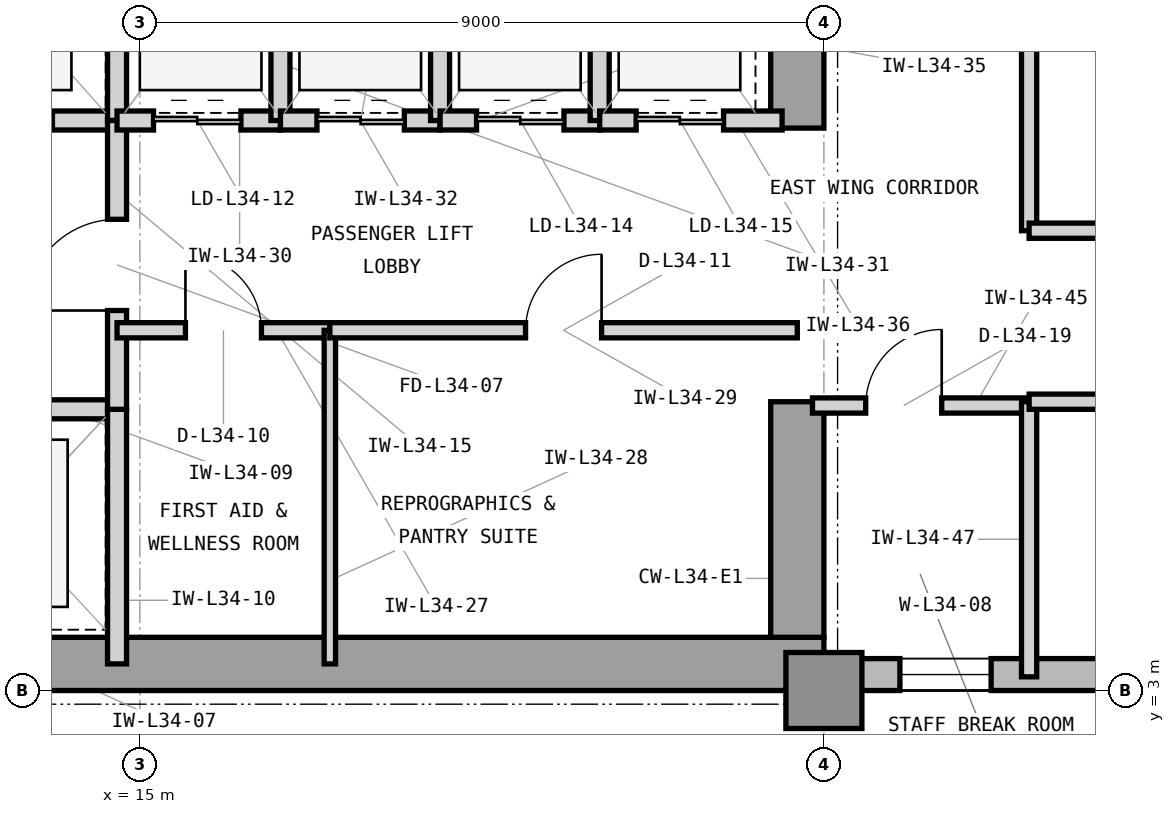
"""IFC4 building model, lengths in metres.
Left out: names, types, materials, properties, quantities, classifications, styles, units other than length and angle.
Written with IfcOpenShell. Run it as: python <this file> out.ifc"""

import sys

from ifc_helpers import new_model, si_unit, direction, frame, frame_2d, origin, origin_2d, place, context, subcontext, project, spatial, rectangle, extrude, element, fill, save


model = new_model("IFC4")
c1 = context("Model", 3, precision=1e-05, world=origin(), true_north=direction((0.0, 1.0)))
c2 = subcontext(c1, "Body", "Model", "MODEL_VIEW")
j1 = project(units=[si_unit("LENGTHUNIT", "METRE"), si_unit("PLANEANGLEUNIT", "RADIAN")], contexts=[c1])
p1 = place(None, origin())
s1 = spatial("IfcSite", under=j1, at=p1, CompositionType="ELEMENT")
p2 = place(p1, origin())
s2 = spatial("IfcBuilding", under=s1, at=p2, CompositionType="ELEMENT")
p3 = place(p2, frame((0.0, 0.0, 144.0)))
s3 = spatial("IfcBuildingStorey", under=s2, at=p3, CompositionType="ELEMENT", Elevation=144.0)
p4 = place(p3, frame((7.475, 3.35, 0.0), z_axis=(0.0, 0.0, 1.0), x_axis=(1.0, 0.0, 0.0)))
e1 = element("IfcWall", 1, at=p4, inside=s3, PredefinedType="SHEAR", context=c2, shape_type="SweptSolid", body=[
    extrude(rectangle(XDim=16.525, YDim=0.7, at=frame_2d((8.262, 0.0))), origin(), (0.0, 0.0, 1.0), 3.9),
])
p5 = place(p3, frame((23.65, 3.7, 0.0), z_axis=(0.0, 0.0, 1.0), x_axis=(0.0, 1.0, 0.0)))
e2 = element("IfcWall", 2, at=p5, inside=s3, PredefinedType="SHEAR", context=c2, shape_type="SweptSolid", body=[
    extrude(rectangle(XDim=3.1, YDim=0.7, at=frame_2d((1.55, 0.0))), origin(), (0.0, 0.0, 1.0), 3.9),
])
p6 = place(p3, frame((23.65, 10.4, 0.0), z_axis=(0.0, 0.0, 1.0), x_axis=(0.0, 1.0, 0.0)))
e3 = element("IfcWall", 3, at=p6, inside=s3, PredefinedType="SHEAR", context=c2, shape_type="SweptSolid", body=[
    extrude(rectangle(XDim=3.2, YDim=0.7, at=frame_2d((1.6, 0.0))), origin(), (0.0, 0.0, 1.0), 3.9),
])
p7 = place(p3, frame((24.0, 3.0, 0.0), z_axis=(0.0, 0.0, 1.0), x_axis=(1.0, 0.0, 0.0)))
e4 = element("IfcColumn", 4, at=p7, inside=s3, PredefinedType="COLUMN", context=c2, shape_type="SweptSolid", body=[
    extrude(rectangle(XDim=1.0, YDim=1.0, at=origin_2d()), origin(), (0.0, 0.0, 1.0), 3.9),
])
p8 = place(p3, frame((23.9, 3.21, 0.0), z_axis=(0.0, 0.0, 1.0), x_axis=(1.0, 0.0, 0.0)))
e5 = element("IfcWall", 5, at=p8, inside=s3, PredefinedType="STANDARD", context=c2, shape_type="SweptSolid", body=[
    extrude(rectangle(XDim=34.5, YDim=0.42, at=frame_2d((17.25, 0.0))), origin(), (0.0, 0.0, 1.0), 3.7),
])
p9 = place(p8, frame((11.071, 0.0, 0.85)))
e6 = element("IfcOpeningElement", 6, at=p9, cuts=e5, PredefinedType="OPENING", context=c2, shape_type="SweptSolid", body=[
    extrude(rectangle(XDim=2.5, YDim=2.25, at=frame_2d((1.25, 1.125))), frame((0.0, 0.22, 0.0), z_axis=(0.0, -1.0, 0.0), x_axis=(1.0, 0.0, 0.0)), (0.0, 0.0, 1.0), 0.44),
])
p10 = place(p8, frame((1.1, 0.0, 0.85)))
e7 = element("IfcOpeningElement", 7, at=p10, cuts=e5, PredefinedType="OPENING", context=c2, shape_type="SweptSolid", body=[
    extrude(rectangle(XDim=1.2, YDim=2.25, at=frame_2d((0.6, 1.125))), frame((0.0, 0.22, 0.0), z_axis=(0.0, -1.0, 0.0), x_axis=(1.0, 0.0, 0.0)), (0.0, 0.0, 1.0), 0.44),
])
p11 = place(p3, frame((11.82, 6.7, 0.0), z_axis=(0.0, 0.0, 1.0), x_axis=(1.0, 0.0, 0.0)))
e8 = element("IfcWall", 8, at=p11, inside=s3, PredefinedType="PARTITIONING", context=c2, shape_type="SweptSolid", body=[
    extrude(rectangle(XDim=2.88, YDim=0.25, at=frame_2d((1.44, 0.0))), origin(), (0.0, 0.0, 1.0), 3.233),
])
p12 = place(p11, frame((0.85, 0.0, 0.0)))
e9 = element("IfcOpeningElement", 9, at=p12, cuts=e8, PredefinedType="OPENING", context=c2, shape_type="SweptSolid", body=[
    extrude(rectangle(XDim=1.1, YDim=2.25, at=frame_2d((0.55, 1.125))), frame((0.0, 0.135, 0.0), z_axis=(0.0, -1.0, 0.0), x_axis=(1.0, 0.0, 0.0)), (0.0, 0.0, 1.0), 0.27),
])
p13 = place(p3, frame((14.7, 3.35, 0.0), z_axis=(0.0, 0.0, 1.0), x_axis=(0.0, 1.0, 0.0)))
e10 = element("IfcWall", 10, at=p13, inside=s3, PredefinedType="PARTITIONING", context=c2, shape_type="SweptSolid", body=[
    extrude(rectangle(XDim=3.35, YDim=0.25, at=frame_2d((1.675, 0.0))), origin(), (0.0, 0.0, 1.0), 3.69),
])
p14 = place(p3, frame((11.95, 10.5, 0.0), z_axis=(0.0, 0.0, 1.0), x_axis=(1.0, 0.0, 0.0)))
e11 = element("IfcWall", 11, at=p14, inside=s3, PredefinedType="PARTITIONING", context=c2, shape_type="SweptSolid", body=[
    extrude(rectangle(XDim=2.75, YDim=0.25, at=frame_2d((1.375, 0.0))), origin(), (0.0, 0.0, 1.0), 3.233),
])
p15 = place(p14, frame((0.8, 0.0, 0.0)))
e12 = element("IfcOpeningElement", 12, at=p15, cuts=e11, PredefinedType="OPENING", context=c2, shape_type="SweptSolid", body=[
    extrude(rectangle(XDim=1.1, YDim=2.25, at=frame_2d((0.55, 1.125))), frame((0.0, 0.135, 0.0), z_axis=(0.0, -1.0, 0.0), x_axis=(1.0, 0.0, 0.0)), (0.0, 0.0, 1.0), 0.27),
])
p16 = place(p3, frame((14.7, 10.5, 0.0), z_axis=(0.0, 0.0, 1.0), x_axis=(0.0, 1.0, 0.0)))
e13 = element("IfcWall", 13, at=p16, inside=s3, PredefinedType="PARTITIONING", context=c2, shape_type="SweptSolid", body=[
    extrude(rectangle(XDim=3.0, YDim=0.25, at=frame_2d((1.5, 0.0))), origin(), (0.0, 0.0, 1.0), 3.69),
])
p17 = place(p3, frame((14.7, 6.7, 0.0), z_axis=(0.0, 0.0, 1.0), x_axis=(0.0, 1.0, 0.0)))
e14 = element("IfcWall", 14, at=p17, inside=s3, PredefinedType="PARTITIONING", context=c2, shape_type="SweptSolid", body=[
    extrude(rectangle(XDim=3.8, YDim=0.25, at=frame_2d((1.9, 0.0))), origin(), (0.0, 0.0, 1.0), 3.69),
])
p18 = place(p17, frame((1.3, 0.0, 0.0)))
e15 = element("IfcOpeningElement", 15, at=p18, cuts=e14, PredefinedType="OPENING", context=c2, shape_type="SweptSolid", body=[
    extrude(rectangle(XDim=1.2, YDim=2.2, at=frame_2d((0.6, 1.1))), frame((0.0, 0.135, 0.0), z_axis=(0.0, -1.0, 0.0), x_axis=(1.0, 0.0, 0.0)), (0.0, 0.0, 1.0), 0.27),
])
p19 = place(p3, frame((14.7, 7.74, 0.0), z_axis=(0.0, 0.0, 1.0), x_axis=(1.0, 0.0, 0.0)))
e16 = element("IfcWall", 16, at=p19, inside=s3, PredefinedType="PARTITIONING", context=c2, shape_type="SweptSolid", body=[
    extrude(rectangle(XDim=2.8, YDim=0.2, at=frame_2d((1.4, 0.0))), origin(), (0.0, 0.0, 1.0), 3.69),
])
p20 = place(p19, frame((0.9, 0.0, 0.0)))
e17 = element("IfcOpeningElement", 17, at=p20, cuts=e16, PredefinedType="OPENING", context=c2, shape_type="SweptSolid", body=[
    extrude(rectangle(XDim=1.0, YDim=2.15, at=frame_2d((0.5, 1.075))), frame((0.0, 0.11, 0.0), z_axis=(0.0, -1.0, 0.0), x_axis=(1.0, 0.0, 0.0)), (0.0, 0.0, 1.0), 0.22),
])
p21 = place(p3, frame((17.5, 3.35, 0.0), z_axis=(0.0, 0.0, 1.0), x_axis=(0.0, 1.0, 0.0)))
e18 = element("IfcWall", 18, at=p21, inside=s3, PredefinedType="PARTITIONING", context=c2, shape_type="SweptSolid", body=[
    extrude(rectangle(XDim=4.39, YDim=0.15, at=frame_2d((2.195, 0.0))), origin(), (0.0, 0.0, 1.0), 3.69),
])
p22 = place(p3, frame((17.5, 7.74, 0.0), z_axis=(0.0, 0.0, 1.0), x_axis=(1.0, 0.0, 0.0)))
e19 = element("IfcWall", 19, at=p22, inside=s3, PredefinedType="PARTITIONING", context=c2, shape_type="SweptSolid", body=[
    extrude(rectangle(XDim=6.15, YDim=0.2, at=frame_2d((3.075, 0.0))), origin(), (0.0, 0.0, 1.0), 3.69),
])
p23 = place(p22, frame((2.575, 0.0, 0.0)))
e20 = element("IfcOpeningElement", 20, at=p23, cuts=e19, PredefinedType="OPENING", context=c2, shape_type="SweptSolid", body=[
    extrude(rectangle(XDim=1.0, YDim=2.15, at=frame_2d((0.5, 1.075))), frame((0.0, 0.11, 0.0), z_axis=(0.0, -1.0, 0.0), x_axis=(1.0, 0.0, 0.0)), (0.0, 0.0, 1.0), 0.22),
])
p24 = place(p3, frame((14.7, 10.5, 0.0), z_axis=(0.0, 0.0, 1.0), x_axis=(1.0, 0.0, 0.0)))
e21 = element("IfcWall", 21, at=p24, inside=s3, PredefinedType="PARTITIONING", context=c2, shape_type="SweptSolid", body=[
    extrude(rectangle(XDim=2.15, YDim=0.25, at=frame_2d((1.075, 0.0))), origin(), (0.0, 0.0, 1.0), 3.233),
])
p25 = place(p24, frame((0.48, 0.0, 0.0)))
e22 = element("IfcOpeningElement", 22, at=p25, cuts=e21, PredefinedType="OPENING", context=c2, shape_type="SweptSolid", body=[
    extrude(rectangle(XDim=1.15, YDim=2.25, at=frame_2d((0.575, 1.125))), frame((0.0, 0.135, 0.0), z_axis=(0.0, -1.0, 0.0), x_axis=(1.0, 0.0, 0.0)), (0.0, 0.0, 1.0), 0.27),
])
p26 = place(p3, frame((16.85, 10.5, 0.0), z_axis=(0.0, 0.0, 1.0), x_axis=(0.0, 1.0, 0.0)))
e23 = element("IfcWall", 23, at=p26, inside=s3, PredefinedType="PARTITIONING", context=c2, shape_type="SweptSolid", body=[
    extrude(rectangle(XDim=3.0, YDim=0.25, at=frame_2d((1.5, 0.0))), origin(), (0.0, 0.0, 1.0), 3.69),
])
p27 = place(p3, frame((16.85, 10.5, 0.0), z_axis=(0.0, 0.0, 1.0), x_axis=(1.0, 0.0, 0.0)))
e24 = element("IfcWall", 24, at=p27, inside=s3, PredefinedType="PARTITIONING", context=c2, shape_type="SweptSolid", body=[
    extrude(rectangle(XDim=2.1, YDim=0.25, at=frame_2d((1.05, 0.0))), origin(), (0.0, 0.0, 1.0), 3.233),
])
p28 = place(p27, frame((0.48, 0.0, 0.0)))
e25 = element("IfcOpeningElement", 25, at=p28, cuts=e24, PredefinedType="OPENING", context=c2, shape_type="SweptSolid", body=[
    extrude(rectangle(XDim=1.15, YDim=2.25, at=frame_2d((0.575, 1.125))), frame((0.0, 0.135, 0.0), z_axis=(0.0, -1.0, 0.0), x_axis=(1.0, 0.0, 0.0)), (0.0, 0.0, 1.0), 0.27),
])
p29 = place(p3, frame((18.95, 10.5, 0.0), z_axis=(0.0, 0.0, 1.0), x_axis=(0.0, 1.0, 0.0)))
e26 = element("IfcWall", 26, at=p29, inside=s3, PredefinedType="PARTITIONING", context=c2, shape_type="SweptSolid", body=[
    extrude(rectangle(XDim=3.0, YDim=0.25, at=frame_2d((1.5, 0.0))), origin(), (0.0, 0.0, 1.0), 3.69),
])
p30 = place(p3, frame((18.95, 10.5, 0.0), z_axis=(0.0, 0.0, 1.0), x_axis=(1.0, 0.0, 0.0)))
e27 = element("IfcWall", 27, at=p30, inside=s3, PredefinedType="PARTITIONING", context=c2, shape_type="SweptSolid", body=[
    extrude(rectangle(XDim=2.1, YDim=0.25, at=frame_2d((1.05, 0.0))), origin(), (0.0, 0.0, 1.0), 3.233),
])
p31 = place(p30, frame((0.48, 0.0, 0.0)))
e28 = element("IfcOpeningElement", 28, at=p31, cuts=e27, PredefinedType="OPENING", context=c2, shape_type="SweptSolid", body=[
    extrude(rectangle(XDim=1.15, YDim=2.25, at=frame_2d((0.575, 1.125))), frame((0.0, 0.135, 0.0), z_axis=(0.0, -1.0, 0.0), x_axis=(1.0, 0.0, 0.0)), (0.0, 0.0, 1.0), 0.27),
])
p32 = place(p3, frame((21.05, 10.5, 0.0), z_axis=(0.0, 0.0, 1.0), x_axis=(0.0, 1.0, 0.0)))
e29 = element("IfcWall", 29, at=p32, inside=s3, PredefinedType="PARTITIONING", context=c2, shape_type="SweptSolid", body=[
    extrude(rectangle(XDim=3.0, YDim=0.25, at=frame_2d((1.5, 0.0))), origin(), (0.0, 0.0, 1.0), 3.69),
])
p33 = place(p3, frame((21.05, 10.5, 0.0), z_axis=(0.0, 0.0, 1.0), x_axis=(1.0, 0.0, 0.0)))
e30 = element("IfcWall", 30, at=p33, inside=s3, PredefinedType="PARTITIONING", context=c2, shape_type="SweptSolid", body=[
    extrude(rectangle(XDim=2.4, YDim=0.25, at=frame_2d((1.2, 0.0))), origin(), (0.0, 0.0, 1.0), 3.233),
])
p34 = place(p33, frame((0.48, 0.0, 0.0)))
e31 = element("IfcOpeningElement", 31, at=p34, cuts=e30, PredefinedType="OPENING", context=c2, shape_type="SweptSolid", body=[
    extrude(rectangle(XDim=1.15, YDim=2.25, at=frame_2d((0.575, 1.125))), frame((0.0, 0.135, 0.0), z_axis=(0.0, -1.0, 0.0), x_axis=(1.0, 0.0, 0.0)), (0.0, 0.0, 1.0), 0.27),
])
p35 = place(p3, frame((23.85, 6.75, 0.0), z_axis=(0.0, 0.0, 1.0), x_axis=(1.0, 0.0, 0.0)))
e32 = element("IfcWall", 32, at=p35, inside=s3, PredefinedType="PARTITIONING", context=c2, shape_type="SweptSolid", body=[
    extrude(rectangle(XDim=2.85, YDim=0.2, at=frame_2d((1.425, 0.0))), origin(), (0.0, 0.0, 1.0), 3.69),
])
p36 = place(p35, frame((0.7, 0.0, 0.0)))
e33 = element("IfcOpeningElement", 33, at=p36, cuts=e32, PredefinedType="OPENING", context=c2, shape_type="SweptSolid", body=[
    extrude(rectangle(XDim=1.0, YDim=2.15, at=frame_2d((0.5, 1.075))), frame((0.0, 0.11, 0.0), z_axis=(0.0, -1.0, 0.0), x_axis=(1.0, 0.0, 0.0)), (0.0, 0.0, 1.0), 0.22),
])
p37 = place(p3, frame((26.7, 3.18, 0.0), z_axis=(0.0, 0.0, 1.0), x_axis=(0.0, 1.0, 0.0)))
e34 = element("IfcWall", 34, at=p37, inside=s3, PredefinedType="PARTITIONING", context=c2, shape_type="SweptSolid", body=[
    extrude(rectangle(XDim=3.62, YDim=0.2, at=frame_2d((1.81, 0.0))), origin(), (0.0, 0.0, 1.0), 3.69),
])
p38 = place(p3, frame((26.7, 9.05, 0.0), z_axis=(0.0, 0.0, 1.0), x_axis=(0.0, 1.0, 0.0)))
e35 = element("IfcWall", 35, at=p38, inside=s3, PredefinedType="PARTITIONING", context=c2, shape_type="SweptSolid", body=[
    extrude(rectangle(XDim=11.77, YDim=0.2, at=frame_2d((5.885, 0.0))), origin(), (0.0, 0.0, 1.0), 3.69),
])
p39 = place(p3, frame((26.7, 6.8, 0.0), z_axis=(0.0, 0.0, 1.0), x_axis=(1.0, 0.0, 0.0)))
e36 = element("IfcWall", 36, at=p39, inside=s3, PredefinedType="PARTITIONING", context=c2, shape_type="SweptSolid", body=[
    extrude(rectangle(XDim=23.8, YDim=0.2, at=frame_2d((11.9, 0.0))), origin(), (0.0, 0.0, 1.0), 3.69),
])
p40 = place(p39, frame((11.4, 0.0, 0.0)))
e37 = element("IfcOpeningElement", 37, at=p40, cuts=e36, PredefinedType="OPENING", context=c2, shape_type="SweptSolid", body=[
    extrude(rectangle(XDim=1.0, YDim=2.15, at=frame_2d((0.5, 1.075))), frame((0.0, 0.11, 0.0), z_axis=(0.0, -1.0, 0.0), x_axis=(1.0, 0.0, 0.0)), (0.0, 0.0, 1.0), 0.22),
])
p41 = place(p3, frame((26.7, 9.05, 0.0), z_axis=(0.0, 0.0, 1.0), x_axis=(1.0, 0.0, 0.0)))
e38 = element("IfcWall", 38, at=p41, inside=s3, PredefinedType="PARTITIONING", context=c2, shape_type="SweptSolid", body=[
    extrude(rectangle(XDim=8.0, YDim=0.2, at=frame_2d((4.0, 0.0))), origin(), (0.0, 0.0, 1.0), 3.233),
])
p42 = place(p41, frame((3.25, 0.0, 0.0)))
e39 = element("IfcOpeningElement", 39, at=p42, cuts=e38, PredefinedType="OPENING", context=c2, shape_type="SweptSolid", body=[
    extrude(rectangle(XDim=1.5, YDim=2.3, at=frame_2d((0.75, 1.15))), frame((0.0, 0.11, 0.0), z_axis=(0.0, -1.0, 0.0), x_axis=(1.0, 0.0, 0.0)), (0.0, 0.0, 1.0), 0.22),
])
p43 = place(p18, origin())
e40 = element("IfcDoor", 40, at=p43, inside=s3, OperationType="SINGLE_SWING_LEFT", PredefinedType="DOOR", context=c2, shape_type="SweptSolid", body=[
    extrude(rectangle(XDim=1.2, YDim=2.2, at=frame_2d((0.6, 1.1))), frame((0.0, 0.025, 0.0), z_axis=(0.0, -1.0, 0.0), x_axis=(1.0, 0.0, 0.0)), (0.0, 0.0, 1.0), 0.05),
])
fill(e15, e40)
p44 = place(p20, origin())
e41 = element("IfcDoor", 41, at=p44, inside=s3, OperationType="SINGLE_SWING_LEFT", PredefinedType="DOOR", context=c2, shape_type="SweptSolid", body=[
    extrude(rectangle(XDim=1.0, YDim=2.15, at=frame_2d((0.5, 1.075))), frame((0.0, 0.025, 0.0), z_axis=(0.0, -1.0, 0.0), x_axis=(1.0, 0.0, 0.0)), (0.0, 0.0, 1.0), 0.05),
])
fill(e17, e41)
p45 = place(p23, origin())
e42 = element("IfcDoor", 42, at=p45, inside=s3, OperationType="SINGLE_SWING_RIGHT", PredefinedType="DOOR", context=c2, shape_type="SweptSolid", body=[
    extrude(rectangle(XDim=1.0, YDim=2.15, at=frame_2d((0.5, 1.075))), frame((0.0, 0.025, 0.0), z_axis=(0.0, -1.0, 0.0), x_axis=(1.0, 0.0, 0.0)), (0.0, 0.0, 1.0), 0.05),
])
fill(e20, e42)
p46 = place(p25, origin())
e43 = element("IfcDoor", 43, at=p46, inside=s3, OperationType="DOUBLE_DOOR_SLIDING", PredefinedType="DOOR", context=c2, shape_type="SweptSolid", body=[
    extrude(rectangle(XDim=1.15, YDim=2.25, at=frame_2d((0.575, 1.125))), frame((0.0, 0.025, 0.0), z_axis=(0.0, -1.0, 0.0), x_axis=(1.0, 0.0, 0.0)), (0.0, 0.0, 1.0), 0.05),
])
fill(e22, e43)
p47 = place(p28, origin())
e44 = element("IfcDoor", 44, at=p47, inside=s3, OperationType="DOUBLE_DOOR_SLIDING", PredefinedType="DOOR", context=c2, shape_type="SweptSolid", body=[
    extrude(rectangle(XDim=1.15, YDim=2.25, at=frame_2d((0.575, 1.125))), frame((0.0, 0.025, 0.0), z_axis=(0.0, -1.0, 0.0), x_axis=(1.0, 0.0, 0.0)), (0.0, 0.0, 1.0), 0.05),
])
fill(e25, e44)
p48 = place(p31, origin())
e45 = element("IfcDoor", 45, at=p48, inside=s3, OperationType="DOUBLE_DOOR_SLIDING", PredefinedType="DOOR", context=c2, shape_type="SweptSolid", body=[
    extrude(rectangle(XDim=1.15, YDim=2.25, at=frame_2d((0.575, 1.125))), frame((0.0, 0.025, 0.0), z_axis=(0.0, -1.0, 0.0), x_axis=(1.0, 0.0, 0.0)), (0.0, 0.0, 1.0), 0.05),
])
fill(e28, e45)
p49 = place(p34, origin())
e46 = element("IfcDoor", 46, at=p49, inside=s3, OperationType="DOUBLE_DOOR_SLIDING", PredefinedType="DOOR", context=c2, shape_type="SweptSolid", body=[
    extrude(rectangle(XDim=1.15, YDim=2.25, at=frame_2d((0.575, 1.125))), frame((0.0, 0.025, 0.0), z_axis=(0.0, -1.0, 0.0), x_axis=(1.0, 0.0, 0.0)), (0.0, 0.0, 1.0), 0.05),
])
fill(e31, e46)
p50 = place(p36, origin())
e47 = element("IfcDoor", 47, at=p50, inside=s3, OperationType="SINGLE_SWING_RIGHT", PredefinedType="DOOR", context=c2, shape_type="SweptSolid", body=[
    extrude(rectangle(XDim=1.0, YDim=2.15, at=frame_2d((0.5, 1.075))), frame((0.0, 0.025, 0.0), z_axis=(0.0, -1.0, 0.0), x_axis=(1.0, 0.0, 0.0)), (0.0, 0.0, 1.0), 0.05),
])
fill(e33, e47)
p51 = place(p10, origin())
e48 = element("IfcWindow", 48, at=p51, inside=s3, PartitioningType="SINGLE_PANEL", PredefinedType="WINDOW", context=c2, shape_type="SweptSolid", body=[
    extrude(rectangle(XDim=1.2, YDim=2.25, at=frame_2d((0.6, 1.125))), frame((0.0, 0.11, 0.0), z_axis=(0.0, -1.0, 0.0), x_axis=(1.0, 0.0, 0.0)), (0.0, 0.0, 1.0), 0.06),
])
fill(e7, e48)
save(model, sys.argv[1])
